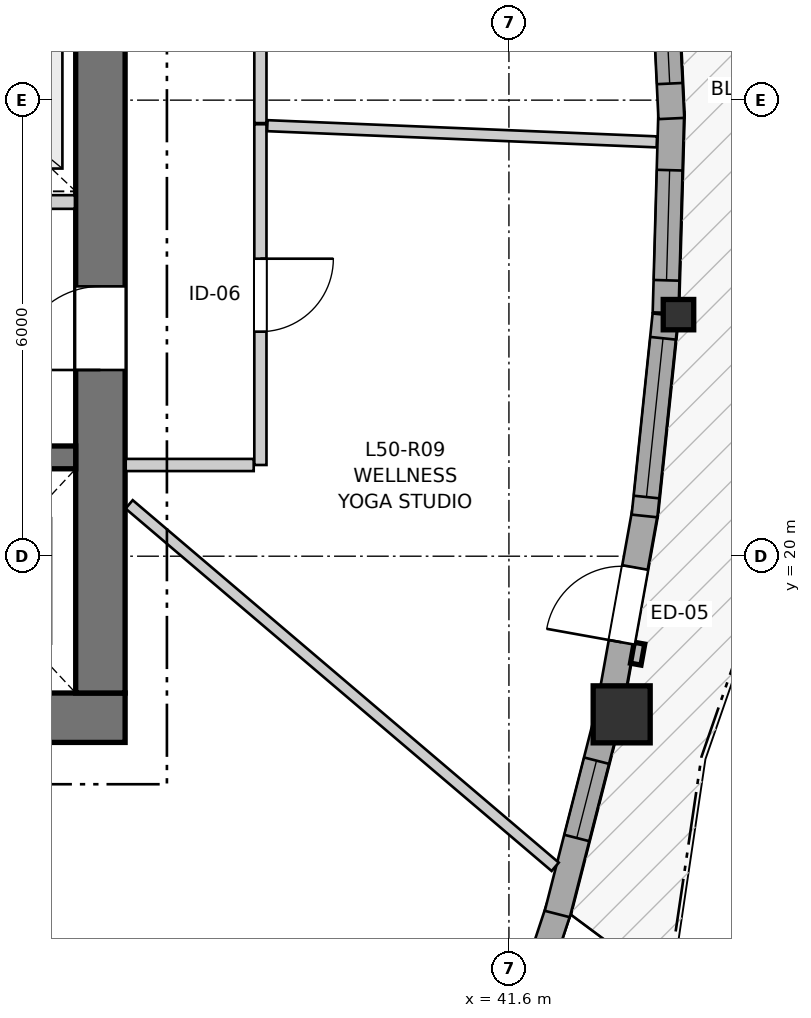
"""IFC4 building model, lengths in metres.
Left out: names, types, materials, properties, quantities, classifications, styles, units other than length and angle.
Written with IfcOpenShell. Run it as: python <this file> out.ifc"""

import sys

from ifc_helpers import new_model, si_unit, direction, frame, frame_2d, origin, origin_2d, place, context, subcontext, project, spatial, rectangle, i_section, extrude, source, transform, mapped, element, fill, save


model = new_model("IFC4")
c1 = context("Model", 3, precision=1e-05, world=origin(), true_north=direction((0.0, 1.0)))
c2 = subcontext(c1, "Body", "Model", "MODEL_VIEW")
j1 = project(units=[si_unit("LENGTHUNIT", "METRE"), si_unit("PLANEANGLEUNIT", "RADIAN")], contexts=[c1])
p1 = place(None, origin())
s1 = spatial("IfcSite", under=j1, at=p1, CompositionType="ELEMENT")
p2 = place(p1, origin())
s2 = spatial("IfcBuilding", under=s1, at=p2, CompositionType="ELEMENT")
p3 = place(p2, frame((0.0, 0.0, 168.2)))
s3 = spatial("IfcBuildingStorey", under=s2, at=p3, CompositionType="ELEMENT", Elevation=168.2)
p4 = place(p3, frame((24.15, 17.875, 0.0), z_axis=(0.0, 0.0, 1.0), x_axis=(1.0, 0.0, 0.0)))
e1 = element("IfcWall", 1, at=p4, inside=s3, PredefinedType="SHEAR", context=c2, shape_type="SweptSolid", body=[
    extrude(rectangle(XDim=12.4, YDim=0.65, at=frame_2d((6.2, 0.0))), origin(), (0.0, 0.0, 1.0), 2.95),
])
p5 = place(p3, frame((36.225, 18.2, 0.0), z_axis=(0.0, 0.0, 1.0), x_axis=(0.0, 1.0, 0.0)))
e2 = element("IfcWall", 2, at=p5, inside=s3, PredefinedType="SHEAR", context=c2, shape_type="SweptSolid", body=[
    extrude(rectangle(XDim=15.6, YDim=0.65, at=frame_2d((7.8, 0.0))), origin(), (0.0, 0.0, 1.0), 2.95),
])
p6 = place(p5, frame((4.25, 0.0, 0.0)))
e3 = element("IfcOpeningElement", 3, at=p6, cuts=e2, PredefinedType="OPENING", context=c2, shape_type="SweptSolid", body=[
    extrude(rectangle(XDim=1.1, YDim=2.15, at=frame_2d((0.55, 1.075))), frame((0.0, 0.335, 0.0), z_axis=(0.0, -1.0, 0.0), x_axis=(1.0, 0.0, 0.0)), (0.0, 0.0, 1.0), 0.67),
])
p7 = place(p5, frame((10.25, 0.0, 0.0)))
e4 = element("IfcOpeningElement", 4, at=p7, cuts=e2, PredefinedType="OPENING", context=c2, shape_type="SweptSolid", body=[
    extrude(rectangle(XDim=1.1, YDim=2.15, at=frame_2d((0.55, 1.075))), frame((0.0, 0.335, 0.0), z_axis=(0.0, -1.0, 0.0), x_axis=(1.0, 0.0, 0.0)), (0.0, 0.0, 1.0), 0.67),
])
p8 = place(p3, frame((24.8, 21.3, 0.0), z_axis=(0.0, 0.0, 1.0), x_axis=(1.0, 0.0, 0.0)))
e5 = element("IfcWall", 5, at=p8, inside=s3, PredefinedType="SHEAR", context=c2, shape_type="SweptSolid", body=[
    extrude(rectangle(XDim=11.1, YDim=0.3, at=frame_2d((5.55, 0.0))), origin(), (0.0, 0.0, 1.0), 2.95),
])
p9 = place(p8, frame((6.22, 0.0, 0.0)))
e6 = element("IfcOpeningElement", 6, at=p9, cuts=e5, PredefinedType="OPENING", context=c2, shape_type="SweptSolid", body=[
    extrude(rectangle(XDim=0.98, YDim=2.15, at=frame_2d((0.49, 1.075))), frame((0.0, 0.16, 0.0), z_axis=(0.0, -1.0, 0.0), x_axis=(1.0, 0.0, 0.0)), (0.0, 0.0, 1.0), 0.32),
])
p10 = place(p8, frame((9.15, 0.0, 0.0)))
e7 = element("IfcOpeningElement", 7, at=p10, cuts=e5, PredefinedType="OPENING", context=c2, shape_type="SweptSolid", body=[
    extrude(rectangle(XDim=1.15, YDim=2.15, at=frame_2d((0.575, 1.075))), frame((0.0, 0.16, 0.0), z_axis=(0.0, -1.0, 0.0), x_axis=(1.0, 0.0, 0.0)), (0.0, 0.0, 1.0), 0.32),
])
m1 = source(origin(), c2, "Body", "SweptSolid", [
    extrude(rectangle(XDim=0.75, YDim=0.75, at=origin_2d()), origin(), (0.0, 0.0, 1.0), 2.95),
])
p11 = place(p3, frame((43.083, 17.919, 0.0), z_axis=(0.0, 0.0, 1.0), x_axis=(1.0, 0.0, 0.0)))
e8 = element("IfcColumn", 8, at=p11, inside=s3, PredefinedType="COLUMN", context=c2, shape_type="MappedRepresentation", body=[
    mapped(m1, transform((0.0, 0.0, 0.0), x_axis=(1.0, 0.0, 0.0), y_axis=(0.0, 1.0, 0.0), z_axis=(0.0, 0.0, 1.0), scale=1.0)),
])
m2 = source(origin(), c2, "Body", "SweptSolid", [
    extrude(i_section(OverallWidth=0.401, OverallDepth=0.399, WebThickness=0.023, FlangeThickness=0.036, FilletRadius=0.015, at=origin_2d()), origin(), (0.0, 0.0, 1.0), 2.95),
])
p12 = place(p3, frame((43.831, 23.178, 0.0), z_axis=(0.0, 0.0, 1.0), x_axis=(1.0, 0.0, 0.0)))
e9 = element("IfcColumn", 9, at=p12, inside=s3, PredefinedType="PILASTER", context=c2, shape_type="MappedRepresentation", body=[
    mapped(m2, transform((0.0, 0.0, 0.0), x_axis=(1.0, 0.0, 0.0), y_axis=(0.0, 1.0, 0.0), z_axis=(0.0, 0.0, 1.0), scale=1.0)),
])
p13 = place(p3, frame((41.383, 12.726, 0.0), z_axis=(0.0, 0.0, 1.0), x_axis=(0.314443872574, 0.949276066801, 0.0)))
e10 = element("IfcWall", 10, at=p13, inside=s3, PredefinedType="SOLIDWALL", context=c2, shape_type="SweptSolid", body=[
    extrude(rectangle(XDim=2.793, YDim=0.34, at=frame_2d((1.396, 0.0))), origin(), (0.0, 0.0, 1.0), 2.53),
])
p14 = place(p13, frame((0.711, 0.0, 0.82)))
e11 = element("IfcOpeningElement", 11, at=p14, cuts=e10, PredefinedType="OPENING", context=c2, shape_type="SweptSolid", body=[
    extrude(rectangle(XDim=1.35, YDim=1.45, at=frame_2d((0.675, 0.725))), frame((0.0, 0.18, 0.0), z_axis=(0.0, -1.0, 0.0), x_axis=(1.0, 0.0, 0.0)), (0.0, 0.0, 1.0), 0.36),
])
p15 = place(p3, frame((42.236, 15.292, 0.0), z_axis=(0.0, 0.0, 1.0), x_axis=(0.24772461275, 0.968830488908, 0.0)))
e12 = element("IfcWall", 12, at=p15, inside=s3, PredefinedType="SOLIDWALL", context=c2, shape_type="SweptSolid", body=[
    extrude(rectangle(XDim=2.6, YDim=0.34, at=frame_2d((1.3, 0.0))), origin(), (0.0, 0.0, 1.0), 2.53),
])
p16 = place(p15, frame((1.033, 0.0, 0.82)))
e13 = element("IfcOpeningElement", 13, at=p16, cuts=e12, PredefinedType="OPENING", context=c2, shape_type="SweptSolid", body=[
    extrude(rectangle(XDim=1.05, YDim=1.45, at=frame_2d((0.525, 0.725))), frame((0.0, 0.18, 0.0), z_axis=(0.0, -1.0, 0.0), x_axis=(1.0, 0.0, 0.0)), (0.0, 0.0, 1.0), 0.36),
])
p17 = place(p3, frame((42.944, 18.102, 0.0), z_axis=(0.0, 0.0, 1.0), x_axis=(0.177119685378, 0.98418931972, 0.0)))
e14 = element("IfcWall", 14, at=p17, inside=s3, PredefinedType="SOLIDWALL", context=c2, shape_type="SweptSolid", body=[
    extrude(rectangle(XDim=2.555, YDim=0.34, at=frame_2d((1.278, 0.0))), origin(), (0.0, 0.0, 1.0), 2.53),
])
p18 = place(p17, frame((0.778, 0.0, 0.0)))
e15 = element("IfcOpeningElement", 15, at=p18, cuts=e14, PredefinedType="OPENING", context=c2, shape_type="SweptSolid", body=[
    extrude(rectangle(XDim=1.0, YDim=2.1, at=frame_2d((0.5, 1.05))), frame((0.0, 0.18, 0.0), z_axis=(0.0, -1.0, 0.0), x_axis=(1.0, 0.0, 0.0)), (0.0, 0.0, 1.0), 0.36),
])
p19 = place(p3, frame((43.384, 20.53, 0.0), z_axis=(0.0, 0.0, 1.0), x_axis=(0.103600410634, 0.994618999877, 0.0)))
e16 = element("IfcWall", 16, at=p19, inside=s3, PredefinedType="SOLIDWALL", context=c2, shape_type="SweptSolid", body=[
    extrude(rectangle(XDim=2.661, YDim=0.34, at=frame_2d((1.33, 0.0))), origin(), (0.0, 0.0, 1.0), 2.53),
])
p20 = place(p19, frame((0.25, 0.0, 0.82)))
e17 = element("IfcOpeningElement", 17, at=p20, cuts=e16, PredefinedType="OPENING", context=c2, shape_type="SweptSolid", body=[
    extrude(rectangle(XDim=2.1, YDim=1.4, at=frame_2d((1.05, 0.7))), frame((0.0, 0.18, 0.0), z_axis=(0.0, -1.0, 0.0), x_axis=(1.0, 0.0, 0.0)), (0.0, 0.0, 1.0), 0.36),
])
p21 = place(p3, frame((43.661, 23.203, 0.0), z_axis=(0.0, 0.0, 1.0), x_axis=(0.028240970376, 0.999601144253, 0.0)))
e18 = element("IfcWall", 18, at=p21, inside=s3, PredefinedType="SOLIDWALL", context=c2, shape_type="SweptSolid", body=[
    extrude(rectangle(XDim=2.645, YDim=0.34, at=frame_2d((1.323, 0.0))), origin(), (0.0, 0.0, 1.0), 2.53),
])
p22 = place(p21, frame((0.427, 0.0, 0.82)))
e19 = element("IfcOpeningElement", 19, at=p22, cuts=e18, PredefinedType="OPENING", context=c2, shape_type="SweptSolid", body=[
    extrude(rectangle(XDim=1.45, YDim=1.25, at=frame_2d((0.725, 0.625))), frame((0.0, 0.18, 0.0), z_axis=(0.0, -1.0, 0.0), x_axis=(1.0, 0.0, 0.0)), (0.0, 0.0, 1.0), 0.36),
])
p23 = place(p3, frame((43.737, 25.758, 0.0), z_axis=(0.0, 0.0, 1.0), x_axis=(-0.047648310491, 0.998864174204, 0.0)))
e20 = element("IfcWall", 20, at=p23, inside=s3, PredefinedType="SOLIDWALL", context=c2, shape_type="SweptSolid", body=[
    extrude(rectangle(XDim=2.511, YDim=0.34, at=frame_2d((1.255, 0.0))), origin(), (0.0, 0.0, 1.0), 2.53),
])
p24 = place(p23, frame((0.46, 0.0, 0.82)))
e21 = element("IfcOpeningElement", 21, at=p24, cuts=e20, PredefinedType="OPENING", context=c2, shape_type="SweptSolid", body=[
    extrude(rectangle(XDim=1.6, YDim=1.35, at=frame_2d((0.8, 0.675))), frame((0.0, 0.18, 0.0), z_axis=(0.0, -1.0, 0.0), x_axis=(1.0, 0.0, 0.0)), (0.0, 0.0, 1.0), 0.36),
])
p25 = place(p3, frame((30.67, 24.66, 0.0), z_axis=(0.0, 0.0, 1.0), x_axis=(1.0, 0.0, 0.0)))
e22 = element("IfcWall", 22, at=p25, inside=s3, PredefinedType="PARTITIONING", context=c2, shape_type="SweptSolid", body=[
    extrude(rectangle(XDim=5.22, YDim=0.18, at=frame_2d((2.61, 0.0))), origin(), (0.0, 0.0, 1.0), 2.95),
])
p26 = place(p25, frame((0.68, 0.0, 0.0)))
e23 = element("IfcOpeningElement", 23, at=p26, cuts=e22, PredefinedType="OPENING", context=c2, shape_type="SweptSolid", body=[
    extrude(rectangle(XDim=0.98, YDim=2.15, at=frame_2d((0.49, 1.075))), frame((0.0, 0.1, 0.0), z_axis=(0.0, -1.0, 0.0), x_axis=(1.0, 0.0, 0.0)), (0.0, 0.0, 1.0), 0.2),
])
p27 = place(p3, frame((38.33, 25.683, 0.0), z_axis=(0.0, 0.0, 1.0), x_axis=(0.0, -1.0, 0.0)))
e24 = element("IfcWall", 24, at=p27, inside=s3, PredefinedType="PARTITIONING", context=c2, shape_type="SweptSolid", body=[
    extrude(rectangle(XDim=4.483, YDim=0.16, at=frame_2d((2.242, 0.0))), origin(), (0.0, 0.0, 1.0), 2.95),
])
p28 = place(p27, frame((1.769, 0.0, 0.0)))
e25 = element("IfcOpeningElement", 25, at=p28, cuts=e24, PredefinedType="OPENING", context=c2, shape_type="SweptSolid", body=[
    extrude(rectangle(XDim=0.96, YDim=2.1, at=frame_2d((0.48, 1.05))), frame((0.0, 0.09, 0.0), z_axis=(0.0, -1.0, 0.0), x_axis=(1.0, 0.0, 0.0)), (0.0, 0.0, 1.0), 0.18),
])
p29 = place(p3, frame((38.33, 29.019, 0.0), z_axis=(0.0, 0.0, 1.0), x_axis=(0.0, -1.0, 0.0)))
e26 = element("IfcWall", 26, at=p29, inside=s3, PredefinedType="PARTITIONING", context=c2, shape_type="SweptSolid", body=[
    extrude(rectangle(XDim=3.321, YDim=0.16, at=frame_2d((1.661, 0.0))), origin(), (0.0, 0.0, 1.0), 2.95),
])
p30 = place(p29, frame((1.01, 0.0, 0.0)))
e27 = element("IfcOpeningElement", 27, at=p30, cuts=e26, PredefinedType="OPENING", context=c2, shape_type="SweptSolid", body=[
    extrude(rectangle(XDim=1.3, YDim=2.1, at=frame_2d((0.65, 1.05))), frame((0.0, 0.09, 0.0), z_axis=(0.0, -1.0, 0.0), x_axis=(1.0, 0.0, 0.0)), (0.0, 0.0, 1.0), 0.18),
])
p31 = place(p3, frame((36.603, 20.682, 0.0), z_axis=(0.0, 0.0, 1.0), x_axis=(0.761710074833, -0.647918020971, 0.0)))
e28 = element("IfcWall", 28, at=p31, inside=s3, PredefinedType="PARTITIONING", context=c2, shape_type="SweptSolid", body=[
    extrude(rectangle(XDim=7.359, YDim=0.145, at=frame_2d((3.68, 0.0))), origin(), (0.0, 0.0, 1.0), 2.95),
])
p32 = place(p3, frame((38.421, 25.664, 0.0), z_axis=(0.0, 0.0, 1.0), x_axis=(0.999132413059, -0.041646382499, 0.0)))
e29 = element("IfcWall", 29, at=p32, inside=s3, PredefinedType="PARTITIONING", context=c2, shape_type="SweptSolid", body=[
    extrude(rectangle(XDim=5.129, YDim=0.145, at=frame_2d((2.565, 0.0))), origin(), (0.0, 0.0, 1.0), 2.95),
])
p33 = place(p3, frame((36.558, 21.2, 0.0), z_axis=(0.0, 0.0, 1.0), x_axis=(1.0, 0.0, 0.0)))
e30 = element("IfcWall", 30, at=p33, inside=s3, PredefinedType="PARTITIONING", context=c2, shape_type="SweptSolid", body=[
    extrude(rectangle(XDim=1.684, YDim=0.16, at=frame_2d((0.842, 0.0))), origin(), (0.0, 0.0, 1.0), 2.95),
])
m3 = source(origin(), c2, "Body", "SweptSolid", [
    extrude(rectangle(XDim=1.05, YDim=1.45, at=frame_2d((0.525, 0.725))), frame((0.0, 0.03, 0.0), z_axis=(0.0, -1.0, 0.0), x_axis=(1.0, 0.0, 0.0)), (0.0, 0.0, 1.0), 0.06),
])
p34 = place(p16, origin())
e31 = element("IfcWindow", 31, at=p34, inside=s3, PartitioningType="SINGLE_PANEL", PredefinedType="WINDOW", context=c2, shape_type="MappedRepresentation", body=[
    mapped(m3, transform((0.0, 0.0, 0.0), x_axis=(1.0, 0.0, 0.0), y_axis=(0.0, 1.0, 0.0), z_axis=(0.0, 0.0, 1.0), scale=1.0)),
])
fill(e13, e31)
m4 = source(origin(), c2, "Body", "SweptSolid", [
    extrude(rectangle(XDim=2.1, YDim=1.4, at=frame_2d((1.05, 0.7))), frame((0.0, 0.03, 0.0), z_axis=(0.0, -1.0, 0.0), x_axis=(1.0, 0.0, 0.0)), (0.0, 0.0, 1.0), 0.06),
])
p35 = place(p20, origin())
e32 = element("IfcWindow", 32, at=p35, inside=s3, PartitioningType="SINGLE_PANEL", PredefinedType="WINDOW", context=c2, shape_type="MappedRepresentation", body=[
    mapped(m4, transform((0.0, 0.0, 0.0), x_axis=(1.0, 0.0, 0.0), y_axis=(0.0, 1.0, 0.0), z_axis=(0.0, 0.0, 1.0), scale=1.0)),
])
fill(e17, e32)
m5 = source(origin(), c2, "Body", "SweptSolid", [
    extrude(rectangle(XDim=1.45, YDim=1.25, at=frame_2d((0.725, 0.625))), frame((0.0, 0.03, 0.0), z_axis=(0.0, -1.0, 0.0), x_axis=(1.0, 0.0, 0.0)), (0.0, 0.0, 1.0), 0.06),
])
p36 = place(p22, origin())
e33 = element("IfcWindow", 33, at=p36, inside=s3, PartitioningType="SINGLE_PANEL", PredefinedType="WINDOW", context=c2, shape_type="MappedRepresentation", body=[
    mapped(m5, transform((0.0, 0.0, 0.0), x_axis=(1.0, 0.0, 0.0), y_axis=(0.0, 1.0, 0.0), z_axis=(0.0, 0.0, 1.0), scale=1.0)),
])
fill(e19, e33)
m6 = source(origin(), c2, "Body", "SweptSolid", [
    extrude(rectangle(XDim=1.6, YDim=1.35, at=frame_2d((0.8, 0.675))), frame((0.0, 0.03, 0.0), z_axis=(0.0, -1.0, 0.0), x_axis=(1.0, 0.0, 0.0)), (0.0, 0.0, 1.0), 0.06),
])
p37 = place(p24, origin())
e34 = element("IfcWindow", 34, at=p37, inside=s3, PartitioningType="SINGLE_PANEL", PredefinedType="WINDOW", context=c2, shape_type="MappedRepresentation", body=[
    mapped(m6, transform((0.0, 0.0, 0.0), x_axis=(1.0, 0.0, 0.0), y_axis=(0.0, 1.0, 0.0), z_axis=(0.0, 0.0, 1.0), scale=1.0)),
])
fill(e21, e34)
m7 = source(origin(), c2, "Body", "SweptSolid", [
    extrude(rectangle(XDim=1.0, YDim=2.1, at=frame_2d((0.5, 1.05))), frame((0.0, 0.025, 0.0), z_axis=(0.0, -1.0, 0.0), x_axis=(1.0, 0.0, 0.0)), (0.0, 0.0, 1.0), 0.05),
])
p38 = place(p18, origin())
e35 = element("IfcDoor", 35, at=p38, inside=s3, OperationType="SINGLE_SWING_LEFT", PredefinedType="DOOR", context=c2, shape_type="MappedRepresentation", body=[
    mapped(m7, transform((0.0, 0.0, 0.0), x_axis=(1.0, 0.0, 0.0), y_axis=(0.0, 1.0, 0.0), z_axis=(0.0, 0.0, 1.0), scale=1.0)),
])
fill(e15, e35)
m8 = source(origin(), c2, "Body", "SweptSolid", [
    extrude(rectangle(XDim=1.1, YDim=2.15, at=frame_2d((0.55, 1.075))), frame((0.0, 0.025, 0.0), z_axis=(0.0, -1.0, 0.0), x_axis=(1.0, 0.0, 0.0)), (0.0, 0.0, 1.0), 0.05),
])
p39 = place(p6, origin())
e36 = element("IfcDoor", 36, at=p39, inside=s3, OperationType="SINGLE_SWING_LEFT", PredefinedType="DOOR", context=c2, shape_type="MappedRepresentation", body=[
    mapped(m8, transform((0.0, 0.0, 0.0), x_axis=(1.0, 0.0, 0.0), y_axis=(0.0, 1.0, 0.0), z_axis=(0.0, 0.0, 1.0), scale=1.0)),
])
fill(e3, e36)
m9 = source(origin(), c2, "Body", "SweptSolid", [
    extrude(rectangle(XDim=0.96, YDim=2.1, at=frame_2d((0.48, 1.05))), frame((0.0, 0.025, 0.0), z_axis=(0.0, -1.0, 0.0), x_axis=(1.0, 0.0, 0.0)), (0.0, 0.0, 1.0), 0.05),
])
p40 = place(p28, origin())
e37 = element("IfcDoor", 37, at=p40, inside=s3, OperationType="SINGLE_SWING_LEFT", PredefinedType="DOOR", context=c2, shape_type="MappedRepresentation", body=[
    mapped(m9, transform((0.0, 0.0, 0.0), x_axis=(1.0, 0.0, 0.0), y_axis=(0.0, 1.0, 0.0), z_axis=(0.0, 0.0, 1.0), scale=1.0)),
])
fill(e25, e37)
save(model, sys.argv[1])
